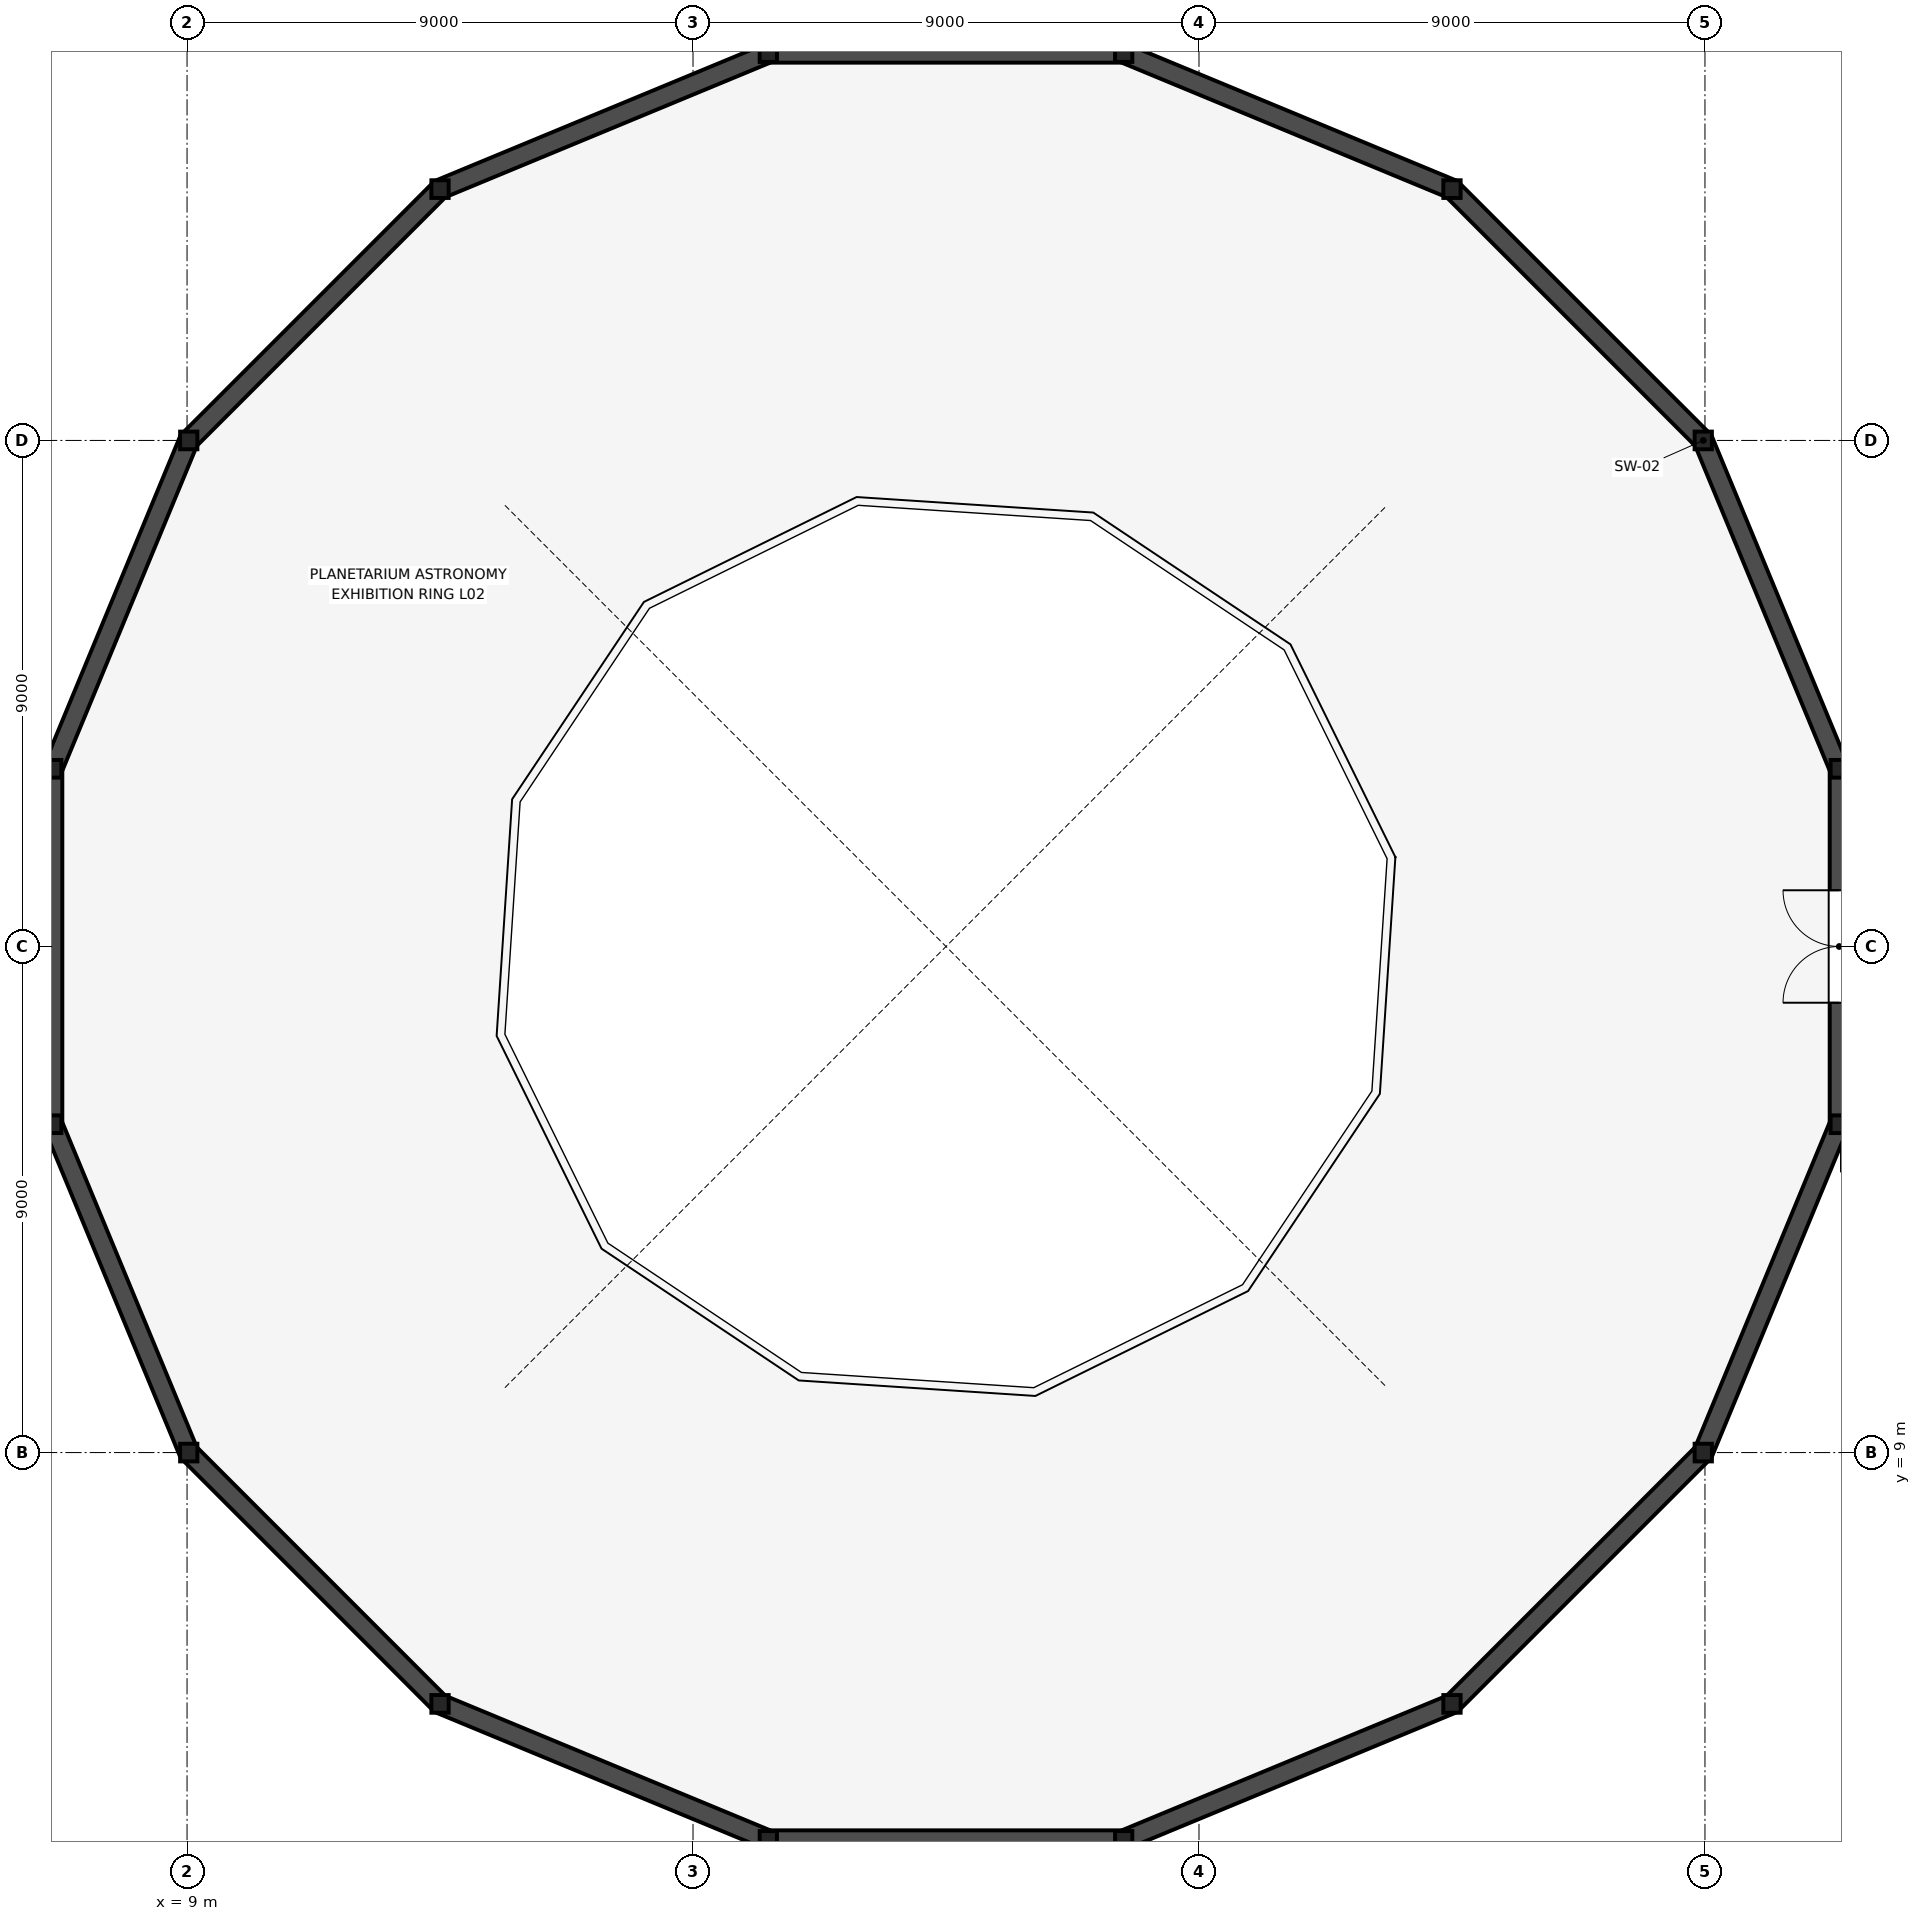
"""IFC4 building model, lengths in metres.
Left out: names, types, materials, properties, quantities, classifications, styles, units other than length and angle.
Written with IfcOpenShell. Run it as: python <this file> out.ifc"""

import sys

from ifc_helpers import new_model, si_unit, direction, frame, frame_2d, origin, origin_2d, place, context, subcontext, project, spatial, rectangle, i_section, extrude, element, fill, save


model = new_model("IFC4")
c1 = context("Model", 3, precision=1e-05, world=origin(), true_north=direction((0.0, 1.0)))
c2 = subcontext(c1, "Body", "Model", "MODEL_VIEW")
j1 = project(units=[si_unit("LENGTHUNIT", "METRE"), si_unit("PLANEANGLEUNIT", "RADIAN")], contexts=[c1])
p1 = place(None, origin())
s1 = spatial("IfcSite", under=j1, at=p1, CompositionType="ELEMENT")
p2 = place(p1, origin())
s2 = spatial("IfcBuilding", under=s1, at=p2, CompositionType="ELEMENT")
p3 = place(p2, frame((0.0, 0.0, 9.9)))
s3 = spatial("IfcBuildingStorey", under=s2, at=p3, CompositionType="ELEMENT", Elevation=9.9)
for number, where, z_axis, x_axis in (
    (1, (38.389, 21.16, 0.0), (0.0, 0.0, 1.0), (1.0, 0.0, 0.0)),
    (2, (35.97, 27.0, 0.0), (0.0, 0.0, 1.0), (1.0, 0.0, 0.0)),
    (3, (31.5, 31.47, 0.0), (0.0, 0.0, 1.0), (1.0, 0.0, 0.0)),
    (4, (25.66, 33.889, 0.0), (0.0, 0.0, 1.0), (1.0, 0.0, 0.0)),
    (5, (19.34, 33.889, 0.0), (0.0, 0.0, 1.0), (1.0, 0.0, 0.0)),
    (6, (13.5, 31.47, 0.0), (0.0, 0.0, 1.0), (1.0, 0.0, 0.0)),
    (7, (9.03, 27.0, 0.0), (0.0, 0.0, 1.0), (1.0, 0.0, 0.0)),
    (8, (6.611, 21.16, 0.0), (0.0, 0.0, 1.0), (1.0, 0.0, 0.0)),
    (9, (6.611, 14.84, 0.0), (0.0, 0.0, 1.0), (1.0, 0.0, 0.0)),
    (10, (9.03, 9.0, 0.0), (0.0, 0.0, 1.0), (1.0, 0.0, 0.0)),
    (11, (13.5, 4.53, 0.0), (0.0, 0.0, 1.0), (1.0, 0.0, 0.0)),
    (12, (19.34, 2.111, 0.0), (0.0, 0.0, 1.0), (1.0, 0.0, 0.0)),
    (13, (25.66, 2.111, 0.0), (0.0, 0.0, 1.0), (1.0, 0.0, 0.0)),
    (14, (31.5, 4.53, 0.0), (0.0, 0.0, 1.0), (1.0, 0.0, 0.0)),
    (15, (35.97, 9.0, 0.0), (0.0, 0.0, 1.0), (1.0, 0.0, 0.0)),
    (16, (38.389, 14.84, 0.0), (0.0, 0.0, 1.0), (1.0, 0.0, 0.0)),
):
    element("IfcColumn", number, at=place(p3, frame(where, z_axis=z_axis, x_axis=x_axis)), inside=s3, PredefinedType="PILASTER", context=c2, shape_type="SweptSolid", body=[
        extrude(i_section(OverallWidth=0.307, OverallDepth=0.315, WebThickness=0.012, FlangeThickness=0.019, FilletRadius=0.017, at=origin_2d()), origin(), (0.0, 0.0, 1.0), 4.5),
    ])
p4 = place(p3, frame((38.389, 21.16, 0.0), z_axis=(0.0, 0.0, 1.0), x_axis=(-0.382683814393, 0.92387937427, 0.0)))
e17 = element("IfcWall", 17, at=p4, inside=s3, PredefinedType="SHEAR", context=c2, shape_type="SweptSolid", body=[
    extrude(rectangle(XDim=6.321, YDim=0.34, at=frame_2d((3.161, 0.0))), origin(), (0.0, 0.0, 1.0), 4.32),
])
p5 = place(p3, frame((35.97, 27.0, 0.0), z_axis=(0.0, 0.0, 1.0), x_axis=(-0.707106781187, 0.707106781187, 0.0)))
e18 = element("IfcWall", 18, at=p5, inside=s3, PredefinedType="SHEAR", context=c2, shape_type="SweptSolid", body=[
    extrude(rectangle(XDim=6.321, YDim=0.34, at=frame_2d((3.16, 0.0))), origin(), (0.0, 0.0, 1.0), 4.32),
])
p6 = place(p3, frame((31.5, 31.47, 0.0), z_axis=(0.0, 0.0, 1.0), x_axis=(-0.92387937427, 0.382683814393, 0.0)))
e19 = element("IfcWall", 19, at=p6, inside=s3, PredefinedType="SHEAR", context=c2, shape_type="SweptSolid", body=[
    extrude(rectangle(XDim=6.321, YDim=0.34, at=frame_2d((3.161, 0.0))), origin(), (0.0, 0.0, 1.0), 4.32),
])
p7 = place(p3, frame((25.66, 33.889, 0.0), z_axis=(0.0, 0.0, 1.0), x_axis=(-1.0, 0.0, 0.0)))
e20 = element("IfcWall", 20, at=p7, inside=s3, PredefinedType="SHEAR", context=c2, shape_type="SweptSolid", body=[
    extrude(rectangle(XDim=6.321, YDim=0.34, at=frame_2d((3.16, 0.0))), origin(), (0.0, 0.0, 1.0), 4.32),
])
p8 = place(p3, frame((19.34, 33.889, 0.0), z_axis=(0.0, 0.0, 1.0), x_axis=(-0.92387937427, -0.382683814393, 0.0)))
e21 = element("IfcWall", 21, at=p8, inside=s3, PredefinedType="SHEAR", context=c2, shape_type="SweptSolid", body=[
    extrude(rectangle(XDim=6.321, YDim=0.34, at=frame_2d((3.161, 0.0))), origin(), (0.0, 0.0, 1.0), 4.32),
])
p9 = place(p3, frame((13.5, 31.47, 0.0), z_axis=(0.0, 0.0, 1.0), x_axis=(-0.707106781187, -0.707106781187, 0.0)))
e22 = element("IfcWall", 22, at=p9, inside=s3, PredefinedType="SHEAR", context=c2, shape_type="SweptSolid", body=[
    extrude(rectangle(XDim=6.321, YDim=0.34, at=frame_2d((3.16, 0.0))), origin(), (0.0, 0.0, 1.0), 4.32),
])
p10 = place(p3, frame((9.03, 27.0, 0.0), z_axis=(0.0, 0.0, 1.0), x_axis=(-0.382683814393, -0.92387937427, 0.0)))
e23 = element("IfcWall", 23, at=p10, inside=s3, PredefinedType="SHEAR", context=c2, shape_type="SweptSolid", body=[
    extrude(rectangle(XDim=6.321, YDim=0.34, at=frame_2d((3.161, 0.0))), origin(), (0.0, 0.0, 1.0), 4.32),
])
p11 = place(p3, frame((6.611, 21.16, 0.0), z_axis=(0.0, 0.0, 1.0), x_axis=(0.0, -1.0, 0.0)))
e24 = element("IfcWall", 24, at=p11, inside=s3, PredefinedType="SHEAR", context=c2, shape_type="SweptSolid", body=[
    extrude(rectangle(XDim=6.321, YDim=0.34, at=frame_2d((3.16, 0.0))), origin(), (0.0, 0.0, 1.0), 4.32),
])
p12 = place(p3, frame((6.611, 14.84, 0.0), z_axis=(0.0, 0.0, 1.0), x_axis=(0.382683814393, -0.92387937427, 0.0)))
e25 = element("IfcWall", 25, at=p12, inside=s3, PredefinedType="SHEAR", context=c2, shape_type="SweptSolid", body=[
    extrude(rectangle(XDim=6.321, YDim=0.34, at=frame_2d((3.161, 0.0))), origin(), (0.0, 0.0, 1.0), 4.32),
])
p13 = place(p3, frame((9.03, 9.0, 0.0), z_axis=(0.0, 0.0, 1.0), x_axis=(0.707106781187, -0.707106781187, 0.0)))
e26 = element("IfcWall", 26, at=p13, inside=s3, PredefinedType="SHEAR", context=c2, shape_type="SweptSolid", body=[
    extrude(rectangle(XDim=6.321, YDim=0.34, at=frame_2d((3.16, 0.0))), origin(), (0.0, 0.0, 1.0), 4.32),
])
p14 = place(p3, frame((13.5, 4.53, 0.0), z_axis=(0.0, 0.0, 1.0), x_axis=(0.92387937427, -0.382683814393, 0.0)))
e27 = element("IfcWall", 27, at=p14, inside=s3, PredefinedType="SHEAR", context=c2, shape_type="SweptSolid", body=[
    extrude(rectangle(XDim=6.321, YDim=0.34, at=frame_2d((3.161, 0.0))), origin(), (0.0, 0.0, 1.0), 4.32),
])
p15 = place(p3, frame((19.34, 2.111, 0.0), z_axis=(0.0, 0.0, 1.0), x_axis=(1.0, 0.0, 0.0)))
e28 = element("IfcWall", 28, at=p15, inside=s3, PredefinedType="SHEAR", context=c2, shape_type="SweptSolid", body=[
    extrude(rectangle(XDim=6.321, YDim=0.34, at=frame_2d((3.16, 0.0))), origin(), (0.0, 0.0, 1.0), 4.32),
])
p16 = place(p3, frame((25.66, 2.111, 0.0), z_axis=(0.0, 0.0, 1.0), x_axis=(0.92387937427, 0.382683814393, 0.0)))
e29 = element("IfcWall", 29, at=p16, inside=s3, PredefinedType="SHEAR", context=c2, shape_type="SweptSolid", body=[
    extrude(rectangle(XDim=6.321, YDim=0.34, at=frame_2d((3.161, 0.0))), origin(), (0.0, 0.0, 1.0), 4.32),
])
p17 = place(p3, frame((31.5, 4.53, 0.0), z_axis=(0.0, 0.0, 1.0), x_axis=(0.707106781187, 0.707106781187, 0.0)))
e30 = element("IfcWall", 30, at=p17, inside=s3, PredefinedType="SHEAR", context=c2, shape_type="SweptSolid", body=[
    extrude(rectangle(XDim=6.321, YDim=0.34, at=frame_2d((3.16, 0.0))), origin(), (0.0, 0.0, 1.0), 4.32),
])
p18 = place(p3, frame((35.97, 9.0, 0.0), z_axis=(0.0, 0.0, 1.0), x_axis=(0.382683814393, 0.92387937427, 0.0)))
e31 = element("IfcWall", 31, at=p18, inside=s3, PredefinedType="SHEAR", context=c2, shape_type="SweptSolid", body=[
    extrude(rectangle(XDim=6.321, YDim=0.34, at=frame_2d((3.161, 0.0))), origin(), (0.0, 0.0, 1.0), 4.32),
])
p19 = place(p3, frame((38.389, 14.84, 0.0), z_axis=(0.0, 0.0, 1.0), x_axis=(0.0, 1.0, 0.0)))
e32 = element("IfcWall", 32, at=p19, inside=s3, PredefinedType="SHEAR", context=c2, shape_type="SweptSolid", body=[
    extrude(rectangle(XDim=6.321, YDim=0.34, at=frame_2d((3.16, 0.0))), origin(), (0.0, 0.0, 1.0), 4.32),
])
p20 = place(p19, frame((2.16, 0.0, 0.0)))
e33 = element("IfcOpeningElement", 33, at=p20, cuts=e32, PredefinedType="OPENING", context=c2, shape_type="SweptSolid", body=[
    extrude(rectangle(XDim=2.0, YDim=2.5, at=frame_2d((1.0, 1.25))), frame((0.0, 0.18, 0.0), z_axis=(0.0, -1.0, 0.0), x_axis=(1.0, 0.0, 0.0)), (0.0, 0.0, 1.0), 0.36),
])
p21 = place(p20, origin())
e34 = element("IfcDoor", 34, at=p21, inside=s3, OperationType="DOUBLE_DOOR_SINGLE_SWING", PredefinedType="DOOR", context=c2, shape_type="SweptSolid", body=[
    extrude(rectangle(XDim=2.0, YDim=2.5, at=frame_2d((1.0, 1.25))), frame((0.0, 0.025, 0.0), z_axis=(0.0, -1.0, 0.0), x_axis=(1.0, 0.0, 0.0)), (0.0, 0.0, 1.0), 0.05),
])
fill(e33, e34)
save(model, sys.argv[1])
